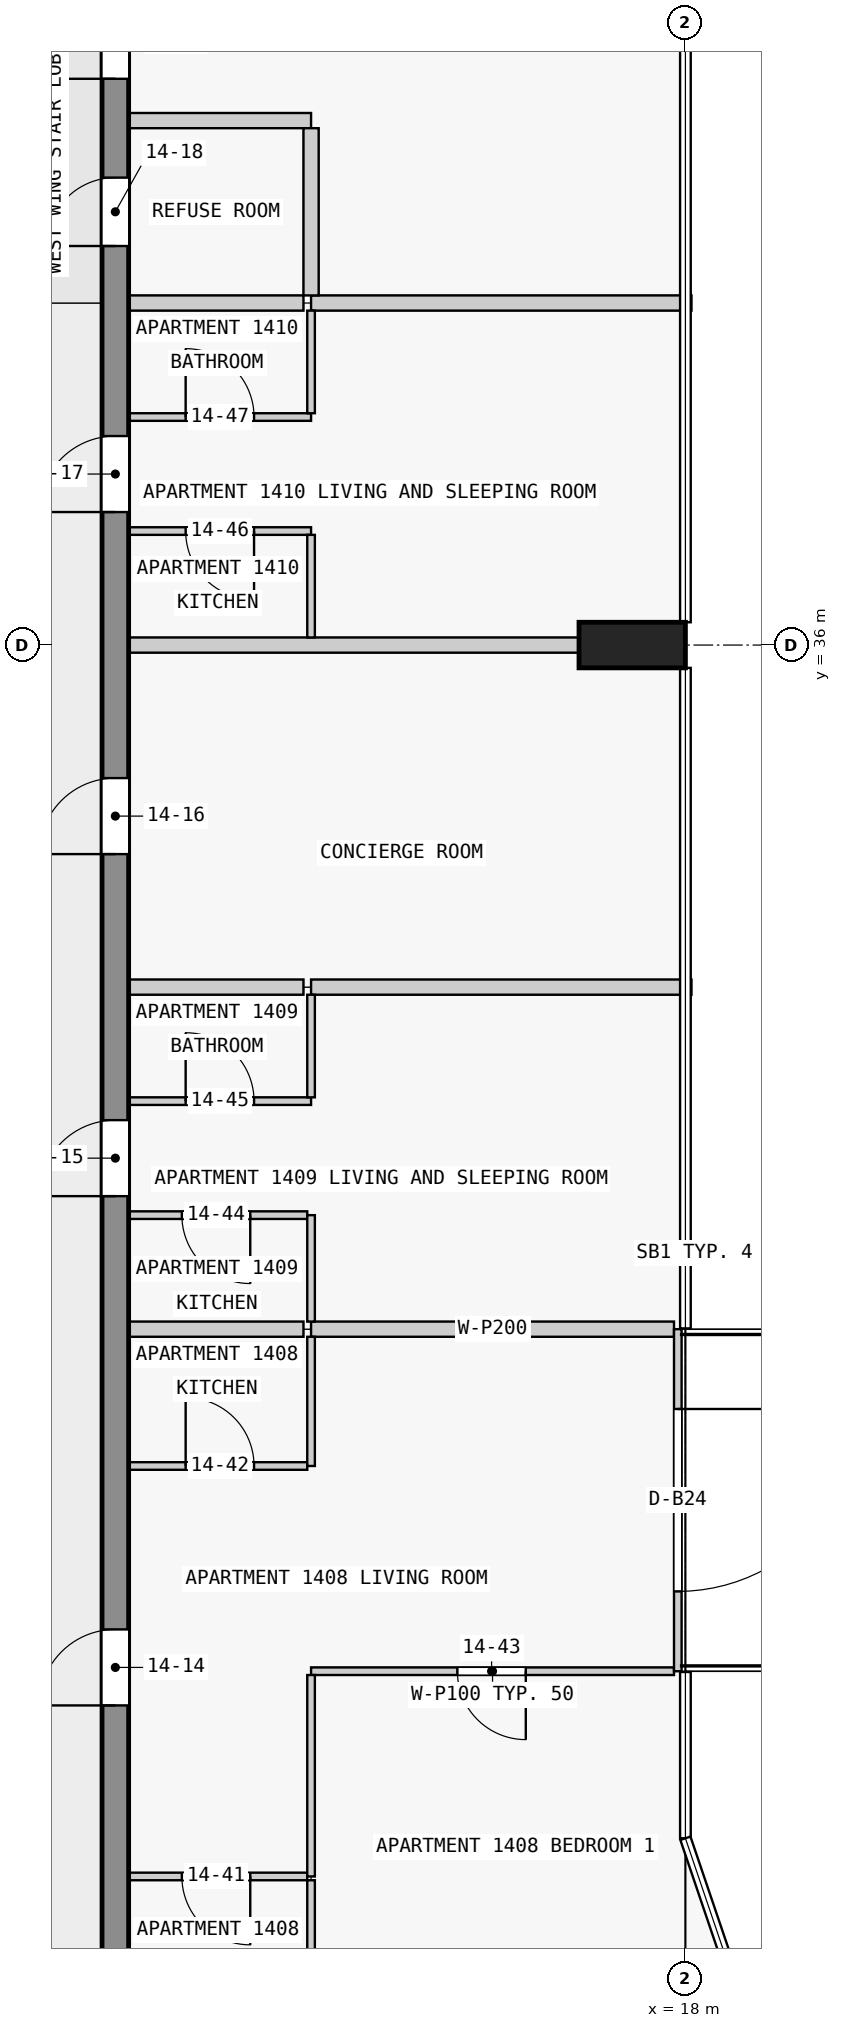
"""IFC4 building model, lengths in metres.
Left out: names, types, materials, properties, quantities, classifications, styles, units other than length and angle.
Written with IfcOpenShell. Run it as: python <this file> out.ifc"""

import sys

from ifc_helpers import new_model, si_unit, direction, frame, frame_2d, origin, origin_2d, place, context, subcontext, project, spatial, rectangle, extrude, element, fill, save


model = new_model("IFC4")
c1 = context("Model", 3, precision=1e-05, world=origin(), true_north=direction((0.0, 1.0)))
c2 = subcontext(c1, "Body", "Model", "MODEL_VIEW")
j1 = project(units=[si_unit("LENGTHUNIT", "METRE"), si_unit("PLANEANGLEUNIT", "RADIAN")], contexts=[c1])
p1 = place(None, origin())
s1 = spatial("IfcSite", under=j1, at=p1, CompositionType="ELEMENT")
p2 = place(p1, origin())
s2 = spatial("IfcBuilding", under=s1, at=p2, CompositionType="ELEMENT")
p3 = place(p2, frame((0.0, 0.0, 58.3)))
s3 = spatial("IfcBuildingStorey", under=s2, at=p3, CompositionType="ELEMENT", Elevation=58.3)
p4 = place(p3, frame((17.3, 36.0, 0.0), z_axis=(0.0, 0.0, 1.0), x_axis=(0.0, 1.0, 0.0)))
e1 = element("IfcColumn", 1, at=p4, inside=s3, PredefinedType="COLUMN", context=c2, shape_type="SweptSolid", body=[
    extrude(rectangle(XDim=0.6, YDim=1.4, at=origin_2d()), origin(), (0.0, 0.0, 1.0), 3.5),
])
p5 = place(p3, frame((10.5, 18.0, 0.0), z_axis=(0.0, 0.0, 1.0), x_axis=(0.0, 1.0, 0.0)))
e2 = element("IfcWall", 2, at=p5, inside=s3, PredefinedType="SHEAR", context=c2, shape_type="SweptSolid", body=[
    extrude(rectangle(XDim=27.0, YDim=0.35, at=frame_2d((13.5, 0.0))), origin(), (0.0, 0.0, 1.0), 3.25),
])
p6 = place(p5, frame((4.05, 0.0, 0.0)))
e3 = element("IfcOpeningElement", 3, at=p6, cuts=e2, PredefinedType="OPENING", context=c2, shape_type="SweptSolid", body=[
    extrude(rectangle(XDim=1.0, YDim=2.1, at=frame_2d((0.5, 1.05))), frame((0.0, 0.185, 0.0), z_axis=(0.0, -1.0, 0.0), x_axis=(1.0, 0.0, 0.0)), (0.0, 0.0, 1.0), 0.37),
])
p7 = place(p5, frame((10.75, 0.0, 0.0)))
e4 = element("IfcOpeningElement", 4, at=p7, cuts=e2, PredefinedType="OPENING", context=c2, shape_type="SweptSolid", body=[
    extrude(rectangle(XDim=1.0, YDim=2.1, at=frame_2d((0.5, 1.05))), frame((0.0, 0.185, 0.0), z_axis=(0.0, -1.0, 0.0), x_axis=(1.0, 0.0, 0.0)), (0.0, 0.0, 1.0), 0.37),
])
p8 = place(p5, frame((15.25, 0.0, 0.0)))
e5 = element("IfcOpeningElement", 5, at=p8, cuts=e2, PredefinedType="OPENING", context=c2, shape_type="SweptSolid", body=[
    extrude(rectangle(XDim=1.0, YDim=2.1, at=frame_2d((0.5, 1.05))), frame((0.0, 0.185, 0.0), z_axis=(0.0, -1.0, 0.0), x_axis=(1.0, 0.0, 0.0)), (0.0, 0.0, 1.0), 0.37),
])
p9 = place(p5, frame((19.75, 0.0, 0.0)))
e6 = element("IfcOpeningElement", 6, at=p9, cuts=e2, PredefinedType="OPENING", context=c2, shape_type="SweptSolid", body=[
    extrude(rectangle(XDim=1.0, YDim=2.1, at=frame_2d((0.5, 1.05))), frame((0.0, 0.185, 0.0), z_axis=(0.0, -1.0, 0.0), x_axis=(1.0, 0.0, 0.0)), (0.0, 0.0, 1.0), 0.37),
])
p10 = place(p5, frame((23.25, 0.0, 0.0)))
e7 = element("IfcOpeningElement", 7, at=p10, cuts=e2, PredefinedType="OPENING", context=c2, shape_type="SweptSolid", body=[
    extrude(rectangle(XDim=0.9, YDim=2.1, at=frame_2d((0.45, 1.05))), frame((0.0, 0.185, 0.0), z_axis=(0.0, -1.0, 0.0), x_axis=(1.0, 0.0, 0.0)), (0.0, 0.0, 1.0), 0.37),
])
p11 = place(p5, frame((25.45, 0.0, 0.0)))
e8 = element("IfcOpeningElement", 8, at=p11, cuts=e2, PredefinedType="OPENING", context=c2, shape_type="SweptSolid", body=[
    extrude(rectangle(XDim=1.0, YDim=2.1, at=frame_2d((0.5, 1.05))), frame((0.0, 0.185, 0.0), z_axis=(0.0, -1.0, 0.0), x_axis=(1.0, 0.0, 0.0)), (0.0, 0.0, 1.0), 0.37),
])
p12 = place(p3, frame((17.9, 27.0, 0.0), z_axis=(0.0, 0.0, 1.0), x_axis=(0.0, -1.0, 0.0)))
e9 = element("IfcWall", 9, at=p12, inside=s3, PredefinedType="STANDARD", context=c2, shape_type="SweptSolid", body=[
    extrude(rectangle(XDim=4.5, YDim=0.1, at=frame_2d((2.25, 0.0))), origin(), (0.0, 0.0, 1.0), 3.25),
])
p13 = place(p12, frame((1.05, 0.0, 0.0)))
e10 = element("IfcOpeningElement", 10, at=p13, cuts=e9, PredefinedType="OPENING", context=c2, shape_type="SweptSolid", body=[
    extrude(rectangle(XDim=2.4, YDim=2.4, at=frame_2d((1.2, 1.2))), frame((0.0, 0.06, 0.0), z_axis=(0.0, -1.0, 0.0), x_axis=(1.0, 0.0, 0.0)), (0.0, 0.0, 1.0), 0.12),
])
p14 = place(p3, frame((13.025, 19.8, 0.0), z_axis=(0.0, 0.0, 1.0), x_axis=(-1.0, 0.0, 0.0)))
e11 = element("IfcWall", 11, at=p14, inside=s3, PredefinedType="PARTITIONING", context=c2, shape_type="SweptSolid", body=[
    extrude(rectangle(XDim=2.35, YDim=0.1, at=frame_2d((1.175, 0.0))), origin(), (0.0, 0.0, 1.0), 3.25),
])
p15 = place(p14, frame((0.75, 0.0, 0.0)))
e12 = element("IfcOpeningElement", 12, at=p15, cuts=e11, PredefinedType="OPENING", context=c2, shape_type="SweptSolid", body=[
    extrude(rectangle(XDim=0.9, YDim=2.1, at=frame_2d((0.45, 1.05))), frame((0.0, 0.06, 0.0), z_axis=(0.0, -1.0, 0.0), x_axis=(1.0, 0.0, 0.0)), (0.0, 0.0, 1.0), 0.12),
])
p16 = place(p3, frame((17.85, 22.5, 0.0), z_axis=(0.0, 0.0, 1.0), x_axis=(-1.0, 0.0, 0.0)))
e13 = element("IfcWall", 13, at=p16, inside=s3, PredefinedType="PARTITIONING", context=c2, shape_type="SweptSolid", body=[
    extrude(rectangle(XDim=4.775, YDim=0.1, at=frame_2d((2.388, 0.0))), origin(), (0.0, 0.0, 1.0), 3.25),
])
p17 = place(p16, frame((1.95, 0.0, 0.0)))
e14 = element("IfcOpeningElement", 14, at=p17, cuts=e13, PredefinedType="OPENING", context=c2, shape_type="SweptSolid", body=[
    extrude(rectangle(XDim=0.9, YDim=2.1, at=frame_2d((0.45, 1.05))), frame((0.0, 0.06, 0.0), z_axis=(0.0, -1.0, 0.0), x_axis=(1.0, 0.0, 0.0)), (0.0, 0.0, 1.0), 0.12),
])
p18 = place(p3, frame((10.675, 25.2, 0.0), z_axis=(0.0, 0.0, 1.0), x_axis=(1.0, 0.0, 0.0)))
e15 = element("IfcWall", 15, at=p18, inside=s3, PredefinedType="PARTITIONING", context=c2, shape_type="SweptSolid", body=[
    extrude(rectangle(XDim=2.35, YDim=0.1, at=frame_2d((1.175, 0.0))), origin(), (0.0, 0.0, 1.0), 3.25),
])
p19 = place(p18, frame((0.75, 0.0, 0.0)))
e16 = element("IfcOpeningElement", 16, at=p19, cuts=e15, PredefinedType="OPENING", context=c2, shape_type="SweptSolid", body=[
    extrude(rectangle(XDim=0.9, YDim=2.1, at=frame_2d((0.45, 1.05))), frame((0.0, 0.06, 0.0), z_axis=(0.0, -1.0, 0.0), x_axis=(1.0, 0.0, 0.0)), (0.0, 0.0, 1.0), 0.12),
])
p20 = place(p3, frame((12.975, 27.0, 0.0), z_axis=(0.0, 0.0, 1.0), x_axis=(-1.0, 0.0, 0.0)))
e17 = element("IfcWall", 17, at=p20, inside=s3, PredefinedType="PARTITIONING", context=c2, shape_type="SweptSolid", body=[
    extrude(rectangle(XDim=2.3, YDim=0.2, at=frame_2d((1.15, 0.0))), origin(), (0.0, 0.0, 1.0), 3.25),
])
p21 = place(p3, frame((13.075, 27.0, 0.0), z_axis=(0.0, 0.0, 1.0), x_axis=(1.0, 0.0, 0.0)))
e18 = element("IfcWall", 18, at=p21, inside=s3, PredefinedType="PARTITIONING", context=c2, shape_type="SweptSolid", body=[
    extrude(rectangle(XDim=4.775, YDim=0.2, at=frame_2d((2.388, 0.0))), origin(), (0.0, 0.0, 1.0), 3.25),
])
p22 = place(p3, frame((13.025, 28.5, 0.0), z_axis=(0.0, 0.0, 1.0), x_axis=(-1.0, 0.0, 0.0)))
e19 = element("IfcWall", 19, at=p22, inside=s3, PredefinedType="PARTITIONING", context=c2, shape_type="SweptSolid", body=[
    extrude(rectangle(XDim=2.35, YDim=0.1, at=frame_2d((1.175, 0.0))), origin(), (0.0, 0.0, 1.0), 3.25),
])
p23 = place(p22, frame((0.75, 0.0, 0.0)))
e20 = element("IfcOpeningElement", 20, at=p23, cuts=e19, PredefinedType="OPENING", context=c2, shape_type="SweptSolid", body=[
    extrude(rectangle(XDim=0.9, YDim=2.1, at=frame_2d((0.45, 1.05))), frame((0.0, 0.06, 0.0), z_axis=(0.0, -1.0, 0.0), x_axis=(1.0, 0.0, 0.0)), (0.0, 0.0, 1.0), 0.12),
])
p24 = place(p3, frame((10.675, 30.0, 0.0), z_axis=(0.0, 0.0, 1.0), x_axis=(1.0, 0.0, 0.0)))
e21 = element("IfcWall", 21, at=p24, inside=s3, PredefinedType="PARTITIONING", context=c2, shape_type="SweptSolid", body=[
    extrude(rectangle(XDim=2.4, YDim=0.1, at=frame_2d((1.2, 0.0))), origin(), (0.0, 0.0, 1.0), 3.25),
])
p25 = place(p24, frame((0.75, 0.0, 0.0)))
e22 = element("IfcOpeningElement", 22, at=p25, cuts=e21, PredefinedType="OPENING", context=c2, shape_type="SweptSolid", body=[
    extrude(rectangle(XDim=0.9, YDim=2.1, at=frame_2d((0.45, 1.05))), frame((0.0, 0.06, 0.0), z_axis=(0.0, -1.0, 0.0), x_axis=(1.0, 0.0, 0.0)), (0.0, 0.0, 1.0), 0.12),
])
p26 = place(p3, frame((12.975, 31.5, 0.0), z_axis=(0.0, 0.0, 1.0), x_axis=(-1.0, 0.0, 0.0)))
e23 = element("IfcWall", 23, at=p26, inside=s3, PredefinedType="PARTITIONING", context=c2, shape_type="SweptSolid", body=[
    extrude(rectangle(XDim=2.3, YDim=0.2, at=frame_2d((1.15, 0.0))), origin(), (0.0, 0.0, 1.0), 3.25),
])
p27 = place(p3, frame((13.075, 31.5, 0.0), z_axis=(0.0, 0.0, 1.0), x_axis=(1.0, 0.0, 0.0)))
e24 = element("IfcWall", 24, at=p27, inside=s3, PredefinedType="PARTITIONING", context=c2, shape_type="SweptSolid", body=[
    extrude(rectangle(XDim=5.005, YDim=0.2, at=frame_2d((2.502, 0.0))), origin(), (0.0, 0.0, 1.0), 3.25),
])
p28 = place(p3, frame((16.6, 36.0, 0.0), z_axis=(0.0, 0.0, 1.0), x_axis=(-1.0, 0.0, 0.0)))
e25 = element("IfcWall", 25, at=p28, inside=s3, PredefinedType="PARTITIONING", context=c2, shape_type="SweptSolid", body=[
    extrude(rectangle(XDim=5.925, YDim=0.2, at=frame_2d((2.962, 0.0))), origin(), (0.0, 0.0, 1.0), 3.25),
])
p29 = place(p3, frame((13.075, 37.5, 0.0), z_axis=(0.0, 0.0, 1.0), x_axis=(-1.0, 0.0, 0.0)))
e26 = element("IfcWall", 26, at=p29, inside=s3, PredefinedType="PARTITIONING", context=c2, shape_type="SweptSolid", body=[
    extrude(rectangle(XDim=2.4, YDim=0.1, at=frame_2d((1.2, 0.0))), origin(), (0.0, 0.0, 1.0), 3.25),
])
p30 = place(p29, frame((0.75, 0.0, 0.0)))
e27 = element("IfcOpeningElement", 27, at=p30, cuts=e26, PredefinedType="OPENING", context=c2, shape_type="SweptSolid", body=[
    extrude(rectangle(XDim=0.9, YDim=2.1, at=frame_2d((0.45, 1.05))), frame((0.0, 0.06, 0.0), z_axis=(0.0, -1.0, 0.0), x_axis=(1.0, 0.0, 0.0)), (0.0, 0.0, 1.0), 0.12),
])
p31 = place(p3, frame((10.675, 39.0, 0.0), z_axis=(0.0, 0.0, 1.0), x_axis=(1.0, 0.0, 0.0)))
e28 = element("IfcWall", 28, at=p31, inside=s3, PredefinedType="PARTITIONING", context=c2, shape_type="SweptSolid", body=[
    extrude(rectangle(XDim=2.4, YDim=0.1, at=frame_2d((1.2, 0.0))), origin(), (0.0, 0.0, 1.0), 3.25),
])
p32 = place(p31, frame((0.75, 0.0, 0.0)))
e29 = element("IfcOpeningElement", 29, at=p32, cuts=e28, PredefinedType="OPENING", context=c2, shape_type="SweptSolid", body=[
    extrude(rectangle(XDim=0.9, YDim=2.1, at=frame_2d((0.45, 1.05))), frame((0.0, 0.06, 0.0), z_axis=(0.0, -1.0, 0.0), x_axis=(1.0, 0.0, 0.0)), (0.0, 0.0, 1.0), 0.12),
])
p33 = place(p3, frame((12.975, 40.5, 0.0), z_axis=(0.0, 0.0, 1.0), x_axis=(-1.0, 0.0, 0.0)))
e30 = element("IfcWall", 30, at=p33, inside=s3, PredefinedType="PARTITIONING", context=c2, shape_type="SweptSolid", body=[
    extrude(rectangle(XDim=2.3, YDim=0.2, at=frame_2d((1.15, 0.0))), origin(), (0.0, 0.0, 1.0), 3.25),
])
p34 = place(p3, frame((13.075, 40.5, 0.0), z_axis=(0.0, 0.0, 1.0), x_axis=(1.0, 0.0, 0.0)))
e31 = element("IfcWall", 31, at=p34, inside=s3, PredefinedType="PARTITIONING", context=c2, shape_type="SweptSolid", body=[
    extrude(rectangle(XDim=5.005, YDim=0.2, at=frame_2d((2.502, 0.0))), origin(), (0.0, 0.0, 1.0), 3.25),
])
p35 = place(p3, frame((13.075, 42.9, 0.0), z_axis=(0.0, 0.0, 1.0), x_axis=(-1.0, 0.0, 0.0)))
e32 = element("IfcWall", 32, at=p35, inside=s3, PredefinedType="PARTITIONING", context=c2, shape_type="SweptSolid", body=[
    extrude(rectangle(XDim=2.4, YDim=0.2, at=frame_2d((1.2, 0.0))), origin(), (0.0, 0.0, 1.0), 3.25),
])
p36 = place(p3, frame((13.075, 22.45, 0.0), z_axis=(0.0, 0.0, 1.0), x_axis=(0.0, -1.0, 0.0)))
e33 = element("IfcWall", 33, at=p36, inside=s3, PredefinedType="PARTITIONING", context=c2, shape_type="SweptSolid", body=[
    extrude(rectangle(XDim=2.65, YDim=0.1, at=frame_2d((1.325, 0.0))), origin(), (0.0, 0.0, 1.0), 3.25),
])
p37 = place(p3, frame((13.075, 18.0, 0.0), z_axis=(0.0, 0.0, 1.0), x_axis=(0.0, 1.0, 0.0)))
e34 = element("IfcWall", 34, at=p37, inside=s3, PredefinedType="PARTITIONING", context=c2, shape_type="SweptSolid", body=[
    extrude(rectangle(XDim=1.75, YDim=0.1, at=frame_2d((0.875, 0.0))), origin(), (0.0, 0.0, 1.0), 3.25),
])
p38 = place(p3, frame((13.075, 25.2, 0.0), z_axis=(0.0, 0.0, 1.0), x_axis=(0.0, 1.0, 0.0)))
e35 = element("IfcWall", 35, at=p38, inside=s3, PredefinedType="PARTITIONING", context=c2, shape_type="SweptSolid", body=[
    extrude(rectangle(XDim=1.7, YDim=0.1, at=frame_2d((0.85, 0.0))), origin(), (0.0, 0.0, 1.0), 3.25),
])
p39 = place(p3, frame((13.075, 27.1, 0.0), z_axis=(0.0, 0.0, 1.0), x_axis=(0.0, 1.0, 0.0)))
e36 = element("IfcWall", 36, at=p39, inside=s3, PredefinedType="PARTITIONING", context=c2, shape_type="SweptSolid", body=[
    extrude(rectangle(XDim=1.4, YDim=0.1, at=frame_2d((0.7, 0.0))), origin(), (0.0, 0.0, 1.0), 3.25),
])
for number, where, z_axis, x_axis in (
    (37, (13.075, 30.05, 0.0), (0.0, 0.0, 1.0), (0.0, 1.0, 0.0)),
    (38, (13.075, 36.1, 0.0), (0.0, 0.0, 1.0), (0.0, 1.0, 0.0)),
    (39, (13.075, 39.05, 0.0), (0.0, 0.0, 1.0), (0.0, 1.0, 0.0)),
):
    element("IfcWall", number, at=place(p3, frame(where, z_axis=z_axis, x_axis=x_axis)), inside=s3, PredefinedType="PARTITIONING", context=c2, shape_type="SweptSolid", body=[
        extrude(rectangle(XDim=1.35, YDim=0.1, at=frame_2d((0.675, 0.0))), origin(), (0.0, 0.0, 1.0), 3.25),
    ])
p40 = place(p3, frame((13.075, 40.6, 0.0), z_axis=(0.0, 0.0, 1.0), x_axis=(0.0, 1.0, 0.0)))
e40 = element("IfcWall", 40, at=p40, inside=s3, PredefinedType="PARTITIONING", context=c2, shape_type="SweptSolid", body=[
    extrude(rectangle(XDim=2.2, YDim=0.2, at=frame_2d((1.1, 0.0))), origin(), (0.0, 0.0, 1.0), 3.25),
])
p41 = place(p13, origin())
e41 = element("IfcDoor", 41, at=p41, inside=s3, OperationType="SINGLE_SWING_LEFT", PredefinedType="DOOR", context=c2, shape_type="SweptSolid", body=[
    extrude(rectangle(XDim=2.4, YDim=2.4, at=frame_2d((1.2, 1.2))), frame((0.0, 0.025, 0.0), z_axis=(0.0, -1.0, 0.0), x_axis=(1.0, 0.0, 0.0)), (0.0, 0.0, 1.0), 0.05),
])
fill(e10, e41)
p42 = place(p6, origin())
e42 = element("IfcDoor", 42, at=p42, inside=s3, OperationType="SINGLE_SWING_LEFT", PredefinedType="DOOR", context=c2, shape_type="SweptSolid", body=[
    extrude(rectangle(XDim=1.0, YDim=2.1, at=frame_2d((0.5, 1.05))), frame((0.0, 0.025, 0.0), z_axis=(0.0, -1.0, 0.0), x_axis=(1.0, 0.0, 0.0)), (0.0, 0.0, 1.0), 0.05),
])
fill(e3, e42)
p43 = place(p7, origin())
e43 = element("IfcDoor", 43, at=p43, inside=s3, OperationType="SINGLE_SWING_LEFT", PredefinedType="DOOR", context=c2, shape_type="SweptSolid", body=[
    extrude(rectangle(XDim=1.0, YDim=2.1, at=frame_2d((0.5, 1.05))), frame((0.0, 0.025, 0.0), z_axis=(0.0, -1.0, 0.0), x_axis=(1.0, 0.0, 0.0)), (0.0, 0.0, 1.0), 0.05),
])
fill(e4, e43)
p44 = place(p8, origin())
e44 = element("IfcDoor", 44, at=p44, inside=s3, OperationType="SINGLE_SWING_RIGHT", PredefinedType="DOOR", context=c2, shape_type="SweptSolid", body=[
    extrude(rectangle(XDim=1.0, YDim=2.1, at=frame_2d((0.5, 1.05))), frame((0.0, 0.025, 0.0), z_axis=(0.0, -1.0, 0.0), x_axis=(1.0, 0.0, 0.0)), (0.0, 0.0, 1.0), 0.05),
])
fill(e5, e44)
p45 = place(p9, origin())
e45 = element("IfcDoor", 45, at=p45, inside=s3, OperationType="SINGLE_SWING_RIGHT", PredefinedType="DOOR", context=c2, shape_type="SweptSolid", body=[
    extrude(rectangle(XDim=1.0, YDim=2.1, at=frame_2d((0.5, 1.05))), frame((0.0, 0.025, 0.0), z_axis=(0.0, -1.0, 0.0), x_axis=(1.0, 0.0, 0.0)), (0.0, 0.0, 1.0), 0.05),
])
fill(e6, e45)
p46 = place(p10, origin())
e46 = element("IfcDoor", 46, at=p46, inside=s3, OperationType="SINGLE_SWING_RIGHT", PredefinedType="DOOR", context=c2, shape_type="SweptSolid", body=[
    extrude(rectangle(XDim=0.9, YDim=2.1, at=frame_2d((0.45, 1.05))), frame((0.0, 0.025, 0.0), z_axis=(0.0, -1.0, 0.0), x_axis=(1.0, 0.0, 0.0)), (0.0, 0.0, 1.0), 0.05),
])
fill(e7, e46)
p47 = place(p11, origin())
e47 = element("IfcDoor", 47, at=p47, inside=s3, OperationType="SINGLE_SWING_RIGHT", PredefinedType="DOOR", context=c2, shape_type="SweptSolid", body=[
    extrude(rectangle(XDim=1.0, YDim=2.1, at=frame_2d((0.5, 1.05))), frame((0.0, 0.025, 0.0), z_axis=(0.0, -1.0, 0.0), x_axis=(1.0, 0.0, 0.0)), (0.0, 0.0, 1.0), 0.05),
])
fill(e8, e47)
p48 = place(p15, origin())
e48 = element("IfcDoor", 48, at=p48, inside=s3, OperationType="SINGLE_SWING_RIGHT", PredefinedType="DOOR", context=c2, shape_type="SweptSolid", body=[
    extrude(rectangle(XDim=0.9, YDim=2.1, at=frame_2d((0.45, 1.05))), frame((0.0, 0.025, 0.0), z_axis=(0.0, -1.0, 0.0), x_axis=(1.0, 0.0, 0.0)), (0.0, 0.0, 1.0), 0.05),
])
fill(e12, e48)
p49 = place(p19, origin())
e49 = element("IfcDoor", 49, at=p49, inside=s3, OperationType="SINGLE_SWING_RIGHT", PredefinedType="DOOR", context=c2, shape_type="SweptSolid", body=[
    extrude(rectangle(XDim=0.9, YDim=2.1, at=frame_2d((0.45, 1.05))), frame((0.0, 0.025, 0.0), z_axis=(0.0, -1.0, 0.0), x_axis=(1.0, 0.0, 0.0)), (0.0, 0.0, 1.0), 0.05),
])
fill(e16, e49)
p50 = place(p17, origin())
e50 = element("IfcDoor", 50, at=p50, inside=s3, OperationType="SINGLE_SWING_RIGHT", PredefinedType="DOOR", context=c2, shape_type="SweptSolid", body=[
    extrude(rectangle(XDim=0.9, YDim=2.1, at=frame_2d((0.45, 1.05))), frame((0.0, 0.025, 0.0), z_axis=(0.0, -1.0, 0.0), x_axis=(1.0, 0.0, 0.0)), (0.0, 0.0, 1.0), 0.05),
])
fill(e14, e50)
p51 = place(p23, origin())
e51 = element("IfcDoor", 51, at=p51, inside=s3, OperationType="SINGLE_SWING_RIGHT", PredefinedType="DOOR", context=c2, shape_type="SweptSolid", body=[
    extrude(rectangle(XDim=0.9, YDim=2.1, at=frame_2d((0.45, 1.05))), frame((0.0, 0.025, 0.0), z_axis=(0.0, -1.0, 0.0), x_axis=(1.0, 0.0, 0.0)), (0.0, 0.0, 1.0), 0.05),
])
fill(e20, e51)
p52 = place(p25, origin())
e52 = element("IfcDoor", 52, at=p52, inside=s3, OperationType="SINGLE_SWING_RIGHT", PredefinedType="DOOR", context=c2, shape_type="SweptSolid", body=[
    extrude(rectangle(XDim=0.9, YDim=2.1, at=frame_2d((0.45, 1.05))), frame((0.0, 0.025, 0.0), z_axis=(0.0, -1.0, 0.0), x_axis=(1.0, 0.0, 0.0)), (0.0, 0.0, 1.0), 0.05),
])
fill(e22, e52)
p53 = place(p30, origin())
e53 = element("IfcDoor", 53, at=p53, inside=s3, OperationType="SINGLE_SWING_RIGHT", PredefinedType="DOOR", context=c2, shape_type="SweptSolid", body=[
    extrude(rectangle(XDim=0.9, YDim=2.1, at=frame_2d((0.45, 1.05))), frame((0.0, 0.025, 0.0), z_axis=(0.0, -1.0, 0.0), x_axis=(1.0, 0.0, 0.0)), (0.0, 0.0, 1.0), 0.05),
])
fill(e27, e53)
p54 = place(p32, origin())
e54 = element("IfcDoor", 54, at=p54, inside=s3, OperationType="SINGLE_SWING_RIGHT", PredefinedType="DOOR", context=c2, shape_type="SweptSolid", body=[
    extrude(rectangle(XDim=0.9, YDim=2.1, at=frame_2d((0.45, 1.05))), frame((0.0, 0.025, 0.0), z_axis=(0.0, -1.0, 0.0), x_axis=(1.0, 0.0, 0.0)), (0.0, 0.0, 1.0), 0.05),
])
fill(e29, e54)
save(model, sys.argv[1])
